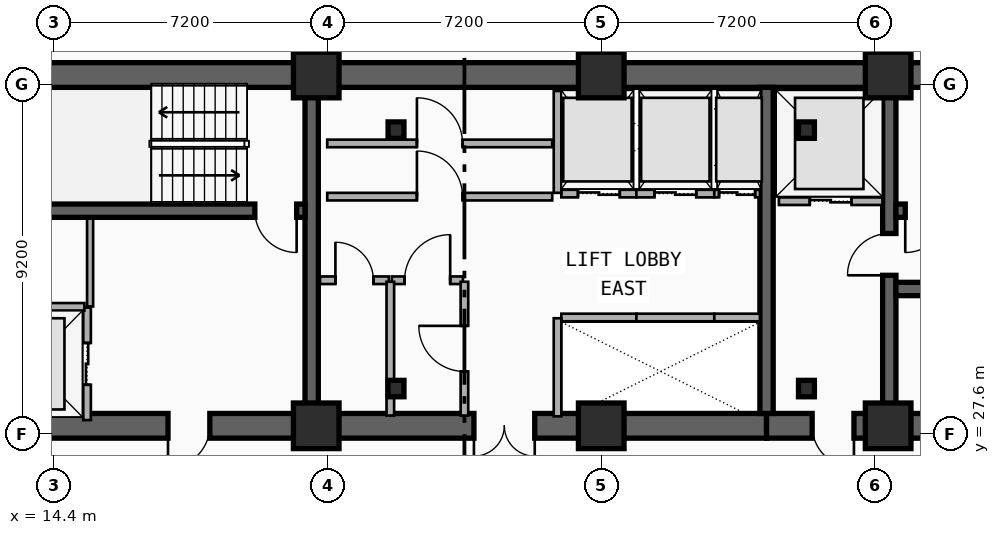
"""IFC4 building model, lengths in metres.
Left out: names, types, materials, properties, quantities, classifications, styles, units other than length and angle.
Written with IfcOpenShell. Run it as: python <this file> out.ifc"""

import sys

from ifc_helpers import new_model, si_unit, direction, frame, frame_2d, origin, origin_2d, place, context, subcontext, project, spatial, rectangle, i_section, extrude, element, fill, save


model = new_model("IFC4")
c1 = context("Model", 3, precision=1e-05, world=origin(), true_north=direction((0.0, 1.0)))
c2 = subcontext(c1, "Body", "Model", "MODEL_VIEW")
j1 = project(units=[si_unit("LENGTHUNIT", "METRE"), si_unit("PLANEANGLEUNIT", "RADIAN")], contexts=[c1])
p1 = place(None, origin())
s1 = spatial("IfcSite", under=j1, at=p1, CompositionType="ELEMENT")
p2 = place(p1, origin())
s2 = spatial("IfcBuilding", under=s1, at=p2, CompositionType="ELEMENT")
p3 = place(p2, frame((0.0, 0.0, 125.8)))
s3 = spatial("IfcBuildingStorey", under=s2, at=p3, CompositionType="ELEMENT", Elevation=125.8)
p4 = place(p3, frame((12.15, 37.05, 0.0), z_axis=(0.0, 0.0, 1.0), x_axis=(1.0, 0.0, 0.0)))
e1 = element("IfcWall", 1, at=p4, inside=s3, PredefinedType="SHEAR", context=c2, shape_type="SweptSolid", body=[
    extrude(rectangle(XDim=33.23, YDim=0.65, at=frame_2d((16.615, 0.0))), origin(), (0.0, 0.0, 1.0), 3.5),
])
p5 = place(p3, frame((21.18, 27.82, 0.0), z_axis=(0.0, 0.0, 1.0), x_axis=(-1.0, 0.0, 0.0)))
e2 = element("IfcWall", 2, at=p5, inside=s3, PredefinedType="SHEAR", context=c2, shape_type="SweptSolid", body=[
    extrude(rectangle(XDim=9.03, YDim=0.65, at=frame_2d((4.515, 0.0))), origin(), (0.0, 0.0, 1.0), 3.5),
])
p6 = place(p5, frame((2.68, 0.0, 0.0)))
e3 = element("IfcOpeningElement", 3, at=p6, cuts=e2, PredefinedType="OPENING", context=c2, shape_type="SweptSolid", body=[
    extrude(rectangle(XDim=1.1, YDim=2.15, at=frame_2d((0.55, 1.075))), frame((0.0, 0.335, 0.0), z_axis=(0.0, -1.0, 0.0), x_axis=(1.0, 0.0, 0.0)), (0.0, 0.0, 1.0), 0.67),
])
p7 = place(p3, frame((33.15, 27.82, 0.0), z_axis=(0.0, 0.0, 1.0), x_axis=(-1.0, 0.0, 0.0)))
e4 = element("IfcWall", 4, at=p7, inside=s3, PredefinedType="SHEAR", context=c2, shape_type="SweptSolid", body=[
    extrude(rectangle(XDim=11.97, YDim=0.65, at=frame_2d((5.985, 0.0))), origin(), (0.0, 0.0, 1.0), 3.5),
])
p8 = place(p7, frame((6.1, 0.0, 0.0)))
e5 = element("IfcOpeningElement", 5, at=p8, cuts=e4, PredefinedType="OPENING", context=c2, shape_type="SweptSolid", body=[
    extrude(rectangle(XDim=1.6, YDim=2.2, at=frame_2d((0.8, 1.1))), frame((0.0, 0.335, 0.0), z_axis=(0.0, -1.0, 0.0), x_axis=(1.0, 0.0, 0.0)), (0.0, 0.0, 1.0), 0.67),
])
p9 = place(p3, frame((45.38, 27.82, 0.0), z_axis=(0.0, 0.0, 1.0), x_axis=(-1.0, 0.0, 0.0)))
e6 = element("IfcWall", 6, at=p9, inside=s3, PredefinedType="SHEAR", context=c2, shape_type="SweptSolid", body=[
    extrude(rectangle(XDim=12.23, YDim=0.65, at=frame_2d((6.115, 0.0))), origin(), (0.0, 0.0, 1.0), 3.5),
])
p10 = place(p9, frame((9.93, 0.0, 0.0)))
e7 = element("IfcOpeningElement", 7, at=p10, cuts=e6, PredefinedType="OPENING", context=c2, shape_type="SweptSolid", body=[
    extrude(rectangle(XDim=1.1, YDim=2.15, at=frame_2d((0.55, 1.075))), frame((0.0, 0.335, 0.0), z_axis=(0.0, -1.0, 0.0), x_axis=(1.0, 0.0, 0.0)), (0.0, 0.0, 1.0), 0.67),
])
p11 = place(p9, frame((6.23, 0.0, 0.0)))
e8 = element("IfcOpeningElement", 8, at=p11, cuts=e6, PredefinedType="OPENING", context=c2, shape_type="SweptSolid", body=[
    extrude(rectangle(XDim=1.1, YDim=2.15, at=frame_2d((0.55, 1.075))), frame((0.0, 0.335, 0.0), z_axis=(0.0, -1.0, 0.0), x_axis=(1.0, 0.0, 0.0)), (0.0, 0.0, 1.0), 0.67),
])
for number, where, z_axis, x_axis in (
    (9, (21.18, 28.145, 0.0), (0.0, 0.0, 1.0), (0.0, 1.0, 0.0)),
    (10, (33.15, 28.145, 0.0), (0.0, 0.0, 1.0), (0.0, 1.0, 0.0)),
):
    element("IfcWall", number, at=place(p3, frame(where, z_axis=z_axis, x_axis=x_axis)), inside=s3, PredefinedType="SHEAR", context=c2, shape_type="SweptSolid", body=[
        extrude(rectangle(XDim=8.58, YDim=0.35, at=frame_2d((4.29, 0.0))), origin(), (0.0, 0.0, 1.0), 3.5),
    ])
p12 = place(p3, frame((36.38, 28.145, 0.0), z_axis=(0.0, 0.0, 1.0), x_axis=(0.0, 1.0, 0.0)))
e11 = element("IfcWall", 11, at=p12, inside=s3, PredefinedType="SHEAR", context=c2, shape_type="SweptSolid", body=[
    extrude(rectangle(XDim=8.58, YDim=0.35, at=frame_2d((4.29, 0.0))), origin(), (0.0, 0.0, 1.0), 3.5),
])
p13 = place(p12, frame((3.635, 0.0, 0.0)))
e12 = element("IfcOpeningElement", 12, at=p13, cuts=e11, PredefinedType="OPENING", context=c2, shape_type="SweptSolid", body=[
    extrude(rectangle(XDim=1.1, YDim=2.15, at=frame_2d((0.55, 1.075))), frame((0.0, 0.185, 0.0), z_axis=(0.0, -1.0, 0.0), x_axis=(1.0, 0.0, 0.0)), (0.0, 0.0, 1.0), 0.37),
])
p14 = place(p3, frame((21.005, 33.48, 0.0), z_axis=(0.0, 0.0, 1.0), x_axis=(-1.0, 0.0, 0.0)))
e13 = element("IfcWall", 13, at=p14, inside=s3, PredefinedType="SHEAR", context=c2, shape_type="SweptSolid", body=[
    extrude(rectangle(XDim=8.53, YDim=0.35, at=frame_2d((4.265, 0.0))), origin(), (0.0, 0.0, 1.0), 3.5),
])
p15 = place(p14, frame((0.22, 0.0, 0.0)))
e14 = element("IfcOpeningElement", 14, at=p15, cuts=e13, PredefinedType="OPENING", context=c2, shape_type="SweptSolid", body=[
    extrude(rectangle(XDim=1.1, YDim=2.15, at=frame_2d((0.55, 1.075))), frame((0.0, 0.185, 0.0), z_axis=(0.0, -1.0, 0.0), x_axis=(1.0, 0.0, 0.0)), (0.0, 0.0, 1.0), 0.37),
])
p16 = place(p3, frame((45.055, 33.48, 0.0), z_axis=(0.0, 0.0, 1.0), x_axis=(-1.0, 0.0, 0.0)))
e15 = element("IfcWall", 15, at=p16, inside=s3, PredefinedType="SHEAR", context=c2, shape_type="SweptSolid", body=[
    extrude(rectangle(XDim=8.5, YDim=0.35, at=frame_2d((4.25, 0.0))), origin(), (0.0, 0.0, 1.0), 3.5),
])
p17 = place(p16, frame((7.155, 0.0, 0.0)))
e16 = element("IfcOpeningElement", 16, at=p17, cuts=e15, PredefinedType="OPENING", context=c2, shape_type="SweptSolid", body=[
    extrude(rectangle(XDim=1.1, YDim=2.15, at=frame_2d((0.55, 1.075))), frame((0.0, 0.185, 0.0), z_axis=(0.0, -1.0, 0.0), x_axis=(1.0, 0.0, 0.0)), (0.0, 0.0, 1.0), 0.37),
])
p18 = place(p3, frame((36.555, 31.42, 0.0), z_axis=(0.0, 0.0, 1.0), x_axis=(1.0, 0.0, 0.0)))
e17 = element("IfcWall", 17, at=p18, inside=s3, PredefinedType="SHEAR", context=c2, shape_type="SweptSolid", body=[
    extrude(rectangle(XDim=8.5, YDim=0.35, at=frame_2d((4.25, 0.0))), origin(), (0.0, 0.0, 1.0), 3.5),
])
for number, where, z_axis, x_axis in (
    (18, (23.4, 28.8, 0.0), (0.0, 0.0, 1.0), (1.0, 0.0, 0.0)),
    (19, (34.2, 28.8, 0.0), (0.0, 0.0, 1.0), (1.0, 0.0, 0.0)),
    (20, (34.2, 35.6, 0.0), (0.0, 0.0, 1.0), (1.0, 0.0, 0.0)),
    (21, (23.4, 35.6, 0.0), (0.0, 0.0, 1.0), (1.0, 0.0, 0.0)),
):
    element("IfcColumn", number, at=place(p3, frame(where, z_axis=z_axis, x_axis=x_axis)), inside=s3, PredefinedType="COLUMN", context=c2, shape_type="SweptSolid", body=[
        extrude(i_section(OverallWidth=0.418, OverallDepth=0.432, WebThickness=0.035, FlangeThickness=0.056, FilletRadius=0.015, at=origin_2d()), origin(), (0.0, 0.0, 1.0), 3.5),
    ])
for number, where, z_axis, x_axis in (
    (22, (21.3, 27.82, 0.0), (0.0, 0.0, 1.0), (1.0, 0.0, 0.0)),
    (23, (21.3, 37.05, 0.0), (0.0, 0.0, 1.0), (1.0, 0.0, 0.0)),
    (24, (28.8, 27.82, 0.0), (0.0, 0.0, 1.0), (1.0, 0.0, 0.0)),
    (25, (28.8, 37.05, 0.0), (0.0, 0.0, 1.0), (1.0, 0.0, 0.0)),
    (26, (36.35, 27.82, 0.0), (0.0, 0.0, 1.0), (1.0, 0.0, 0.0)),
    (27, (36.35, 37.05, 0.0), (0.0, 0.0, 1.0), (1.0, 0.0, 0.0)),
):
    element("IfcColumn", number, at=place(p3, frame(where, z_axis=z_axis, x_axis=x_axis)), inside=s3, PredefinedType="COLUMN", context=c2, shape_type="SweptSolid", body=[
        extrude(rectangle(XDim=1.2, YDim=1.2, at=origin_2d()), origin(), (0.0, 0.0, 1.0), 3.5),
    ])
p19 = place(p3, frame((15.27, 27.97, 0.0), z_axis=(0.0, 0.0, 1.0), x_axis=(0.0, 1.0, 0.0)))
e28 = element("IfcWall", 28, at=p19, inside=s3, PredefinedType="PARTITIONING", context=c2, shape_type="SweptSolid", body=[
    extrude(rectangle(XDim=2.96, YDim=0.2, at=frame_2d((1.48, 0.0))), origin(), (0.0, 0.0, 1.0), 2.212),
])
p20 = place(p19, frame((0.93, 0.0, 0.0)))
e29 = element("IfcOpeningElement", 29, at=p20, cuts=e28, PredefinedType="OPENING", context=c2, shape_type="SweptSolid", body=[
    extrude(rectangle(XDim=1.1, YDim=2.15, at=frame_2d((0.55, 1.075))), frame((0.0, 0.11, 0.0), z_axis=(0.0, -1.0, 0.0), x_axis=(1.0, 0.0, 0.0)), (0.0, 0.0, 1.0), 0.22),
])
p21 = place(p3, frame((12.45, 30.95, 0.0), z_axis=(0.0, 0.0, 1.0), x_axis=(1.0, 0.0, 0.0)))
e30 = element("IfcWall", 30, at=p21, inside=s3, PredefinedType="PARTITIONING", context=c2, shape_type="SweptSolid", body=[
    extrude(rectangle(XDim=2.75, YDim=0.2, at=frame_2d((1.375, 0.0))), origin(), (0.0, 0.0, 1.0), 2.212),
])
p22 = place(p3, frame((33.475, 33.73, 0.0), z_axis=(0.0, 0.0, 1.0), x_axis=(1.0, 0.0, 0.0)))
e31 = element("IfcWall", 31, at=p22, inside=s3, PredefinedType="PARTITIONING", context=c2, shape_type="SweptSolid", body=[
    extrude(rectangle(XDim=2.725, YDim=0.2, at=frame_2d((1.362, 0.0))), origin(), (0.0, 0.0, 1.0), 2.212),
])
p23 = place(p22, frame((0.812, 0.0, 0.0)))
e32 = element("IfcOpeningElement", 32, at=p23, cuts=e31, PredefinedType="OPENING", context=c2, shape_type="SweptSolid", body=[
    extrude(rectangle(XDim=1.1, YDim=2.15, at=frame_2d((0.55, 1.075))), frame((0.0, 0.11, 0.0), z_axis=(0.0, -1.0, 0.0), x_axis=(1.0, 0.0, 0.0)), (0.0, 0.0, 1.0), 0.22),
])
p24 = place(p3, frame((27.75, 30.67, 0.0), z_axis=(0.0, 0.0, 1.0), x_axis=(1.0, 0.0, 0.0)))
e33 = element("IfcWall", 33, at=p24, inside=s3, PredefinedType="PARTITIONING", context=c2, shape_type="SweptSolid", body=[
    extrude(rectangle(XDim=1.975, YDim=0.2, at=frame_2d((0.988, 0.0))), origin(), (0.0, 0.0, 1.0), 2.212),
])
p25 = place(p3, frame((27.65, 28.07, 0.0), z_axis=(0.0, 0.0, 1.0), x_axis=(0.0, 1.0, 0.0)))
e34 = element("IfcWall", 34, at=p25, inside=s3, PredefinedType="PARTITIONING", context=c2, shape_type="SweptSolid", body=[
    extrude(rectangle(XDim=2.58, YDim=0.2, at=frame_2d((1.29, 0.0))), origin(), (0.0, 0.0, 1.0), 2.212),
])
p26 = place(p3, frame((29.725, 30.67, 0.0), z_axis=(0.0, 0.0, 1.0), x_axis=(1.0, 0.0, 0.0)))
e35 = element("IfcWall", 35, at=p26, inside=s3, PredefinedType="PARTITIONING", context=c2, shape_type="SweptSolid", body=[
    extrude(rectangle(XDim=2.05, YDim=0.2, at=frame_2d((1.025, 0.0))), origin(), (0.0, 0.0, 1.0), 2.62),
])
p27 = place(p3, frame((31.775, 30.67, 0.0), z_axis=(0.0, 0.0, 1.0), x_axis=(1.0, 0.0, 0.0)))
e36 = element("IfcWall", 36, at=p27, inside=s3, PredefinedType="PARTITIONING", context=c2, shape_type="SweptSolid", body=[
    extrude(rectangle(XDim=1.2, YDim=0.2, at=frame_2d((0.6, 0.0))), origin(), (0.0, 0.0, 1.0), 2.62),
])
p28 = place(p3, frame((27.75, 33.93, 0.0), z_axis=(0.0, 0.0, 1.0), x_axis=(1.0, 0.0, 0.0)))
e37 = element("IfcWall", 37, at=p28, inside=s3, PredefinedType="PARTITIONING", context=c2, shape_type="SweptSolid", body=[
    extrude(rectangle(XDim=1.975, YDim=0.2, at=frame_2d((0.988, 0.0))), origin(), (0.0, 0.0, 1.0), 2.212),
])
p29 = place(p28, frame((0.438, 0.0, 0.0)))
e38 = element("IfcOpeningElement", 38, at=p29, cuts=e37, PredefinedType="OPENING", context=c2, shape_type="SweptSolid", body=[
    extrude(rectangle(XDim=1.1, YDim=2.15, at=frame_2d((0.55, 1.075))), frame((0.0, 0.11, 0.0), z_axis=(0.0, -1.0, 0.0), x_axis=(1.0, 0.0, 0.0)), (0.0, 0.0, 1.0), 0.22),
])
p30 = place(p3, frame((27.65, 33.95, 0.0), z_axis=(0.0, 0.0, 1.0), x_axis=(0.0, 1.0, 0.0)))
e39 = element("IfcWall", 39, at=p30, inside=s3, PredefinedType="PARTITIONING", context=c2, shape_type="SweptSolid", body=[
    extrude(rectangle(XDim=2.68, YDim=0.2, at=frame_2d((1.34, 0.0))), origin(), (0.0, 0.0, 1.0), 2.212),
])
p31 = place(p3, frame((29.725, 33.93, 0.0), z_axis=(0.0, 0.0, 1.0), x_axis=(1.0, 0.0, 0.0)))
e40 = element("IfcWall", 40, at=p31, inside=s3, PredefinedType="PARTITIONING", context=c2, shape_type="SweptSolid", body=[
    extrude(rectangle(XDim=2.05, YDim=0.2, at=frame_2d((1.025, 0.0))), origin(), (0.0, 0.0, 1.0), 3.24),
])
p32 = place(p31, frame((0.475, 0.0, 0.0)))
e41 = element("IfcOpeningElement", 41, at=p32, cuts=e40, PredefinedType="OPENING", context=c2, shape_type="SweptSolid", body=[
    extrude(rectangle(XDim=1.1, YDim=2.15, at=frame_2d((0.55, 1.075))), frame((0.0, 0.11, 0.0), z_axis=(0.0, -1.0, 0.0), x_axis=(1.0, 0.0, 0.0)), (0.0, 0.0, 1.0), 0.22),
])
p33 = place(p3, frame((31.775, 33.93, 0.0), z_axis=(0.0, 0.0, 1.0), x_axis=(1.0, 0.0, 0.0)))
e42 = element("IfcWall", 42, at=p33, inside=s3, PredefinedType="PARTITIONING", context=c2, shape_type="SweptSolid", body=[
    extrude(rectangle(XDim=1.2, YDim=0.2, at=frame_2d((0.6, 0.0))), origin(), (0.0, 0.0, 1.0), 3.24),
])
p34 = place(p33, frame((0.125, 0.0, 0.0)))
e43 = element("IfcOpeningElement", 43, at=p34, cuts=e42, PredefinedType="OPENING", context=c2, shape_type="SweptSolid", body=[
    extrude(rectangle(XDim=0.95, YDim=2.15, at=frame_2d((0.475, 1.075))), frame((0.0, 0.11, 0.0), z_axis=(0.0, -1.0, 0.0), x_axis=(1.0, 0.0, 0.0)), (0.0, 0.0, 1.0), 0.22),
])
p35 = place(p3, frame((21.4, 31.65, 0.0), z_axis=(0.0, 0.0, 1.0), x_axis=(1.0, 0.0, 0.0)))
e44 = element("IfcWall", 44, at=p35, inside=s3, PredefinedType="PARTITIONING", context=c2, shape_type="SweptSolid", body=[
    extrude(rectangle(XDim=1.81, YDim=0.2, at=frame_2d((0.905, 0.0))), origin(), (0.0, 0.0, 1.0), 2.28),
])
p36 = place(p35, frame((0.405, 0.0, 0.0)))
e45 = element("IfcOpeningElement", 45, at=p36, cuts=e44, PredefinedType="OPENING", context=c2, shape_type="SweptSolid", body=[
    extrude(rectangle(XDim=1.0, YDim=2.15, at=frame_2d((0.5, 1.075))), frame((0.0, 0.11, 0.0), z_axis=(0.0, -1.0, 0.0), x_axis=(1.0, 0.0, 0.0)), (0.0, 0.0, 1.0), 0.22),
])
p37 = place(p3, frame((23.29, 31.65, 0.0), z_axis=(0.0, 0.0, 1.0), x_axis=(1.0, 0.0, 0.0)))
e46 = element("IfcWall", 46, at=p37, inside=s3, PredefinedType="PARTITIONING", context=c2, shape_type="SweptSolid", body=[
    extrude(rectangle(XDim=1.87, YDim=0.2, at=frame_2d((0.935, 0.0))), origin(), (0.0, 0.0, 1.0), 3.24),
])
p38 = place(p37, frame((0.335, 0.0, 0.0)))
e47 = element("IfcOpeningElement", 47, at=p38, cuts=e46, PredefinedType="OPENING", context=c2, shape_type="SweptSolid", body=[
    extrude(rectangle(XDim=1.2, YDim=2.15, at=frame_2d((0.6, 1.075))), frame((0.0, 0.11, 0.0), z_axis=(0.0, -1.0, 0.0), x_axis=(1.0, 0.0, 0.0)), (0.0, 0.0, 1.0), 0.22),
])
p39 = place(p3, frame((21.59, 33.85, 0.0), z_axis=(0.0, 0.0, 1.0), x_axis=(1.0, 0.0, 0.0)))
e48 = element("IfcWall", 48, at=p39, inside=s3, PredefinedType="PARTITIONING", context=c2, shape_type="SweptSolid", body=[
    extrude(rectangle(XDim=5.92, YDim=0.2, at=frame_2d((2.96, 0.0))), origin(), (0.0, 0.0, 1.0), 2.28),
])
p40 = place(p39, frame((2.36, 0.0, 0.0)))
e49 = element("IfcOpeningElement", 49, at=p40, cuts=e48, PredefinedType="OPENING", context=c2, shape_type="SweptSolid", body=[
    extrude(rectangle(XDim=1.2, YDim=2.15, at=frame_2d((0.6, 1.075))), frame((0.0, 0.11, 0.0), z_axis=(0.0, -1.0, 0.0), x_axis=(1.0, 0.0, 0.0)), (0.0, 0.0, 1.0), 0.22),
])
p41 = place(p3, frame((25.2, 28.09, 0.0), z_axis=(0.0, 0.0, 1.0), x_axis=(0.0, 1.0, 0.0)))
e50 = element("IfcWall", 50, at=p41, inside=s3, PredefinedType="PARTITIONING", context=c2, shape_type="SweptSolid", body=[
    extrude(rectangle(XDim=3.52, YDim=0.2, at=frame_2d((1.76, 0.0))), origin(), (0.0, 0.0, 1.0), 2.62),
])
p42 = place(p41, frame((1.16, 0.0, 0.0)))
e51 = element("IfcOpeningElement", 51, at=p42, cuts=e50, PredefinedType="OPENING", context=c2, shape_type="SweptSolid", body=[
    extrude(rectangle(XDim=1.2, YDim=2.15, at=frame_2d((0.6, 1.075))), frame((0.0, 0.11, 0.0), z_axis=(0.0, -1.0, 0.0), x_axis=(1.0, 0.0, 0.0)), (0.0, 0.0, 1.0), 0.22),
])
p43 = place(p3, frame((23.25, 28.09, 0.0), z_axis=(0.0, 0.0, 1.0), x_axis=(0.0, 1.0, 0.0)))
e52 = element("IfcWall", 52, at=p43, inside=s3, PredefinedType="PARTITIONING", context=c2, shape_type="SweptSolid", body=[
    extrude(rectangle(XDim=3.52, YDim=0.2, at=frame_2d((1.76, 0.0))), origin(), (0.0, 0.0, 1.0), 2.62),
])
p44 = place(p3, frame((21.59, 35.25, 0.0), z_axis=(0.0, 0.0, 1.0), x_axis=(1.0, 0.0, 0.0)))
e53 = element("IfcWall", 53, at=p44, inside=s3, PredefinedType="PARTITIONING", context=c2, shape_type="SweptSolid", body=[
    extrude(rectangle(XDim=5.92, YDim=0.2, at=frame_2d((2.96, 0.0))), origin(), (0.0, 0.0, 1.0), 2.28),
])
p45 = place(p44, frame((2.36, 0.0, 0.0)))
e54 = element("IfcOpeningElement", 54, at=p45, cuts=e53, PredefinedType="OPENING", context=c2, shape_type="SweptSolid", body=[
    extrude(rectangle(XDim=1.2, YDim=2.15, at=frame_2d((0.6, 1.075))), frame((0.0, 0.11, 0.0), z_axis=(0.0, -1.0, 0.0), x_axis=(1.0, 0.0, 0.0)), (0.0, 0.0, 1.0), 0.22),
])
p46 = place(p3, frame((15.35, 30.96, 0.0), z_axis=(0.0, 0.0, 1.0), x_axis=(0.0, 1.0, 0.0)))
e55 = element("IfcWall", 55, at=p46, inside=s3, PredefinedType="PARTITIONING", context=c2, shape_type="SweptSolid", body=[
    extrude(rectangle(XDim=2.31, YDim=0.16, at=frame_2d((1.155, 0.0))), origin(), (0.0, 0.0, 1.0), 3.24),
])
p47 = place(p20, origin())
e56 = element("IfcDoor", 56, at=p47, inside=s3, OperationType="DOUBLE_DOOR_SLIDING", PredefinedType="DOOR", context=c2, shape_type="SweptSolid", body=[
    extrude(rectangle(XDim=1.1, YDim=2.15, at=frame_2d((0.55, 1.075))), frame((0.0, 0.025, 0.0), z_axis=(0.0, -1.0, 0.0), x_axis=(1.0, 0.0, 0.0)), (0.0, 0.0, 1.0), 0.05),
])
fill(e29, e56)
p48 = place(p23, origin())
e57 = element("IfcDoor", 57, at=p48, inside=s3, OperationType="DOUBLE_DOOR_SLIDING", PredefinedType="DOOR", context=c2, shape_type="SweptSolid", body=[
    extrude(rectangle(XDim=1.1, YDim=2.15, at=frame_2d((0.55, 1.075))), frame((0.0, 0.025, 0.0), z_axis=(0.0, -1.0, 0.0), x_axis=(1.0, 0.0, 0.0)), (0.0, 0.0, 1.0), 0.05),
])
fill(e32, e57)
p49 = place(p29, origin())
e58 = element("IfcDoor", 58, at=p49, inside=s3, OperationType="DOUBLE_DOOR_SLIDING", PredefinedType="DOOR", context=c2, shape_type="SweptSolid", body=[
    extrude(rectangle(XDim=1.1, YDim=2.15, at=frame_2d((0.55, 1.075))), frame((0.0, 0.025, 0.0), z_axis=(0.0, -1.0, 0.0), x_axis=(1.0, 0.0, 0.0)), (0.0, 0.0, 1.0), 0.05),
])
fill(e38, e58)
p50 = place(p32, origin())
e59 = element("IfcDoor", 59, at=p50, inside=s3, OperationType="DOUBLE_DOOR_SLIDING", PredefinedType="DOOR", context=c2, shape_type="SweptSolid", body=[
    extrude(rectangle(XDim=1.1, YDim=2.15, at=frame_2d((0.55, 1.075))), frame((0.0, 0.025, 0.0), z_axis=(0.0, -1.0, 0.0), x_axis=(1.0, 0.0, 0.0)), (0.0, 0.0, 1.0), 0.05),
])
fill(e41, e59)
p51 = place(p34, origin())
e60 = element("IfcDoor", 60, at=p51, inside=s3, OperationType="DOUBLE_DOOR_SLIDING", PredefinedType="DOOR", context=c2, shape_type="SweptSolid", body=[
    extrude(rectangle(XDim=0.95, YDim=2.15, at=frame_2d((0.475, 1.075))), frame((0.0, 0.025, 0.0), z_axis=(0.0, -1.0, 0.0), x_axis=(1.0, 0.0, 0.0)), (0.0, 0.0, 1.0), 0.05),
])
fill(e43, e60)
p52 = place(p15, origin())
e61 = element("IfcDoor", 61, at=p52, inside=s3, OperationType="SINGLE_SWING_LEFT", PredefinedType="DOOR", context=c2, shape_type="SweptSolid", body=[
    extrude(rectangle(XDim=1.1, YDim=2.15, at=frame_2d((0.55, 1.075))), frame((0.0, 0.025, 0.0), z_axis=(0.0, -1.0, 0.0), x_axis=(1.0, 0.0, 0.0)), (0.0, 0.0, 1.0), 0.05),
])
fill(e14, e61)
p53 = place(p6, origin())
e62 = element("IfcDoor", 62, at=p53, inside=s3, OperationType="SINGLE_SWING_RIGHT", PredefinedType="DOOR", context=c2, shape_type="SweptSolid", body=[
    extrude(rectangle(XDim=1.1, YDim=2.15, at=frame_2d((0.55, 1.075))), frame((0.0, 0.025, 0.0), z_axis=(0.0, -1.0, 0.0), x_axis=(1.0, 0.0, 0.0)), (0.0, 0.0, 1.0), 0.05),
])
fill(e3, e62)
p54 = place(p17, origin())
e63 = element("IfcDoor", 63, at=p54, inside=s3, OperationType="SINGLE_SWING_RIGHT", PredefinedType="DOOR", context=c2, shape_type="SweptSolid", body=[
    extrude(rectangle(XDim=1.1, YDim=2.15, at=frame_2d((0.55, 1.075))), frame((0.0, 0.025, 0.0), z_axis=(0.0, -1.0, 0.0), x_axis=(1.0, 0.0, 0.0)), (0.0, 0.0, 1.0), 0.05),
])
fill(e16, e63)
p55 = place(p13, origin())
e64 = element("IfcDoor", 64, at=p55, inside=s3, OperationType="SINGLE_SWING_LEFT", PredefinedType="DOOR", context=c2, shape_type="SweptSolid", body=[
    extrude(rectangle(XDim=1.1, YDim=2.15, at=frame_2d((0.55, 1.075))), frame((0.0, 0.025, 0.0), z_axis=(0.0, -1.0, 0.0), x_axis=(1.0, 0.0, 0.0)), (0.0, 0.0, 1.0), 0.05),
])
fill(e12, e64)
p56 = place(p10, origin())
e65 = element("IfcDoor", 65, at=p56, inside=s3, OperationType="SINGLE_SWING_LEFT", PredefinedType="DOOR", context=c2, shape_type="SweptSolid", body=[
    extrude(rectangle(XDim=1.1, YDim=2.15, at=frame_2d((0.55, 1.075))), frame((0.0, 0.025, 0.0), z_axis=(0.0, -1.0, 0.0), x_axis=(1.0, 0.0, 0.0)), (0.0, 0.0, 1.0), 0.05),
])
fill(e7, e65)
p57 = place(p8, origin())
e66 = element("IfcDoor", 66, at=p57, inside=s3, OperationType="SINGLE_SWING_LEFT", PredefinedType="DOOR", context=c2, shape_type="SweptSolid", body=[
    extrude(rectangle(XDim=1.6, YDim=2.2, at=frame_2d((0.8, 1.1))), frame((0.0, 0.025, 0.0), z_axis=(0.0, -1.0, 0.0), x_axis=(1.0, 0.0, 0.0)), (0.0, 0.0, 1.0), 0.05),
])
fill(e5, e66)
p58 = place(p36, origin())
e67 = element("IfcDoor", 67, at=p58, inside=s3, OperationType="SINGLE_SWING_LEFT", PredefinedType="DOOR", context=c2, shape_type="SweptSolid", body=[
    extrude(rectangle(XDim=1.0, YDim=2.15, at=frame_2d((0.5, 1.075))), frame((0.0, 0.025, 0.0), z_axis=(0.0, -1.0, 0.0), x_axis=(1.0, 0.0, 0.0)), (0.0, 0.0, 1.0), 0.05),
])
fill(e45, e67)
p59 = place(p38, origin())
e68 = element("IfcDoor", 68, at=p59, inside=s3, OperationType="SINGLE_SWING_RIGHT", PredefinedType="DOOR", context=c2, shape_type="SweptSolid", body=[
    extrude(rectangle(XDim=1.2, YDim=2.15, at=frame_2d((0.6, 1.075))), frame((0.0, 0.025, 0.0), z_axis=(0.0, -1.0, 0.0), x_axis=(1.0, 0.0, 0.0)), (0.0, 0.0, 1.0), 0.05),
])
fill(e47, e68)
p60 = place(p40, origin())
e69 = element("IfcDoor", 69, at=p60, inside=s3, OperationType="SINGLE_SWING_LEFT", PredefinedType="DOOR", context=c2, shape_type="SweptSolid", body=[
    extrude(rectangle(XDim=1.2, YDim=2.15, at=frame_2d((0.6, 1.075))), frame((0.0, 0.025, 0.0), z_axis=(0.0, -1.0, 0.0), x_axis=(1.0, 0.0, 0.0)), (0.0, 0.0, 1.0), 0.05),
])
fill(e49, e69)
p61 = place(p42, origin())
e70 = element("IfcDoor", 70, at=p61, inside=s3, OperationType="SINGLE_SWING_RIGHT", PredefinedType="DOOR", context=c2, shape_type="SweptSolid", body=[
    extrude(rectangle(XDim=1.2, YDim=2.15, at=frame_2d((0.6, 1.075))), frame((0.0, 0.025, 0.0), z_axis=(0.0, -1.0, 0.0), x_axis=(1.0, 0.0, 0.0)), (0.0, 0.0, 1.0), 0.05),
])
fill(e51, e70)
p62 = place(p45, origin())
e71 = element("IfcDoor", 71, at=p62, inside=s3, OperationType="SINGLE_SWING_LEFT", PredefinedType="DOOR", context=c2, shape_type="SweptSolid", body=[
    extrude(rectangle(XDim=1.2, YDim=2.15, at=frame_2d((0.6, 1.075))), frame((0.0, 0.025, 0.0), z_axis=(0.0, -1.0, 0.0), x_axis=(1.0, 0.0, 0.0)), (0.0, 0.0, 1.0), 0.05),
])
fill(e54, e71)
save(model, sys.argv[1])
